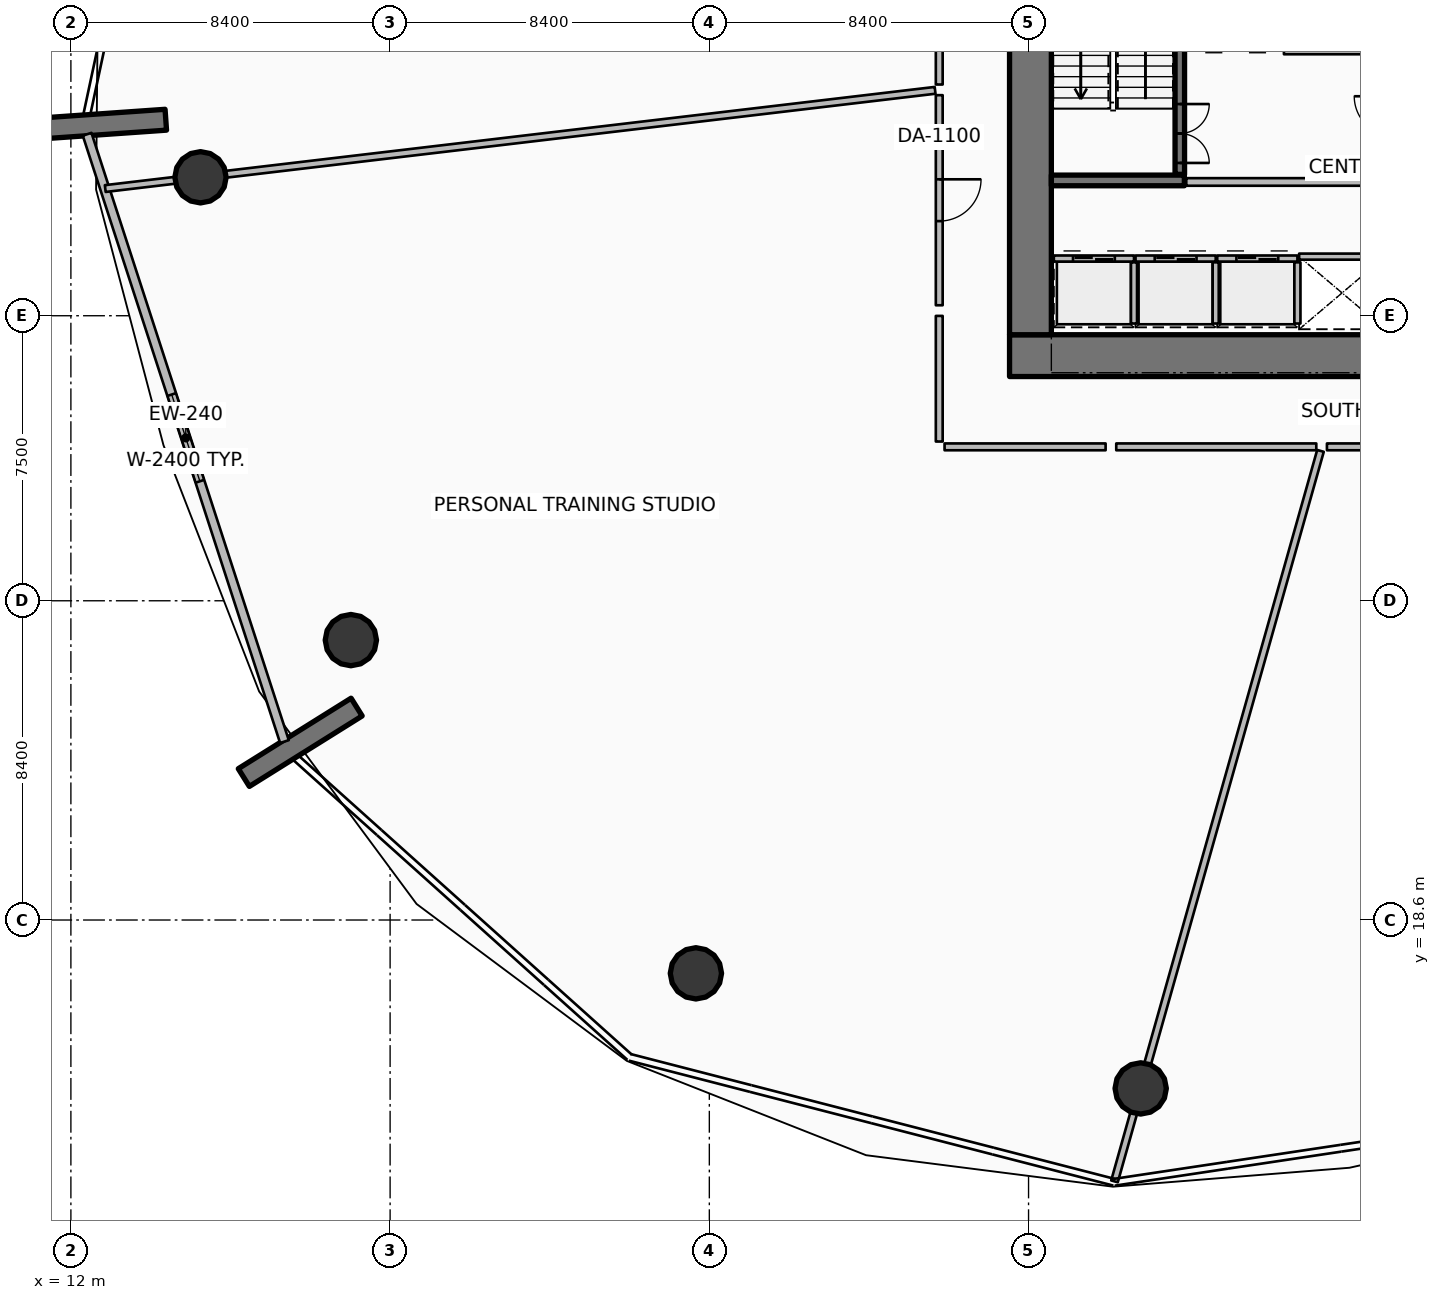
"""IFC4 building model, lengths in metres.
Left out: names, types, materials, properties, quantities, classifications, styles, units other than length and angle.
Written with IfcOpenShell. Run it as: python <this file> out.ifc"""

import sys

from ifc_helpers import new_model, si_unit, direction, frame, frame_2d, origin, origin_2d, place, context, subcontext, project, spatial, rectangle, circle, extrude, element, fill, save


model = new_model("IFC4")
c1 = context("Model", 3, precision=1e-05, world=origin(), true_north=direction((0.0, 1.0)))
c2 = subcontext(c1, "Body", "Model", "MODEL_VIEW")
j1 = project(units=[si_unit("LENGTHUNIT", "METRE"), si_unit("PLANEANGLEUNIT", "RADIAN")], contexts=[c1])
p1 = place(None, origin())
s1 = spatial("IfcSite", under=j1, at=p1, CompositionType="ELEMENT")
p2 = place(p1, origin())
s2 = spatial("IfcBuilding", under=s1, at=p2, CompositionType="ELEMENT")
p3 = place(p2, frame((0.0, 0.0, 16.8)))
s3 = spatial("IfcBuildingStorey", under=s2, at=p3, CompositionType="ELEMENT", Elevation=16.8)
p4 = place(p3, frame((36.7, 33.45, 0.0), z_axis=(0.0, 0.0, 1.0), x_axis=(1.0, 0.0, 0.0)))
e1 = element("IfcWall", 1, at=p4, inside=s3, PredefinedType="SHEAR", context=c2, shape_type="SweptSolid", body=[
    extrude(rectangle(XDim=10.2, YDim=1.1, at=frame_2d((5.1, 0.0))), origin(), (0.0, 0.0, 1.0), 4.8),
])
p5 = place(p3, frame((37.25, 34.0, 0.0), z_axis=(0.0, 0.0, 1.0), x_axis=(0.0, 1.0, 0.0)))
e2 = element("IfcWall", 2, at=p5, inside=s3, PredefinedType="SHEAR", context=c2, shape_type="SweptSolid", body=[
    extrude(rectangle(XDim=16.0, YDim=1.1, at=frame_2d((8.0, 0.0))), origin(), (0.0, 0.0, 1.0), 4.8),
])
p6 = place(p3, frame((37.8, 38.06, 0.0), z_axis=(0.0, 0.0, 1.0), x_axis=(1.0, 0.0, 0.0)))
e3 = element("IfcWall", 3, at=p6, inside=s3, PredefinedType="SHEAR", context=c2, shape_type="SweptSolid", body=[
    extrude(rectangle(XDim=3.5, YDim=0.28, at=frame_2d((1.75, 0.0))), origin(), (0.0, 0.0, 1.0), 4.8),
])
for number, where, z_axis, x_axis in (
    (4, (14.497, 39.657, 0.0), (0.0, 0.0, 1.0), (-0.998, -0.07, 0.0)),
    (5, (19.519, 24.203, 0.0), (0.0, 0.0, 1.0), (-0.848, -0.53, 0.0)),
):
    element("IfcWall", number, at=place(p3, frame(where, z_axis=z_axis, x_axis=x_axis)), inside=s3, PredefinedType="SOLIDWALL", context=c2, shape_type="SweptSolid", body=[
        extrude(rectangle(XDim=3.5, YDim=0.55, at=frame_2d((1.75, 0.0))), origin(), (0.0, 0.0, 1.0), 4.8),
    ])
for number, where, z_axis, x_axis in (
    (6, (15.41, 38.143, 0.0), (0.0, 0.0, 1.0), (1.0, 0.0, 0.0)),
    (7, (19.367, 25.965, 0.0), (0.0, 0.0, 1.0), (1.0, 0.0, 0.0)),
    (8, (28.447, 17.197, 0.0), (0.0, 0.0, 1.0), (1.0, 0.0, 0.0)),
    (9, (40.151, 14.169, 0.0), (0.0, 0.0, 1.0), (1.0, 0.0, 0.0)),
):
    element("IfcColumn", number, at=place(p3, frame(where, z_axis=z_axis, x_axis=x_axis)), inside=s3, PredefinedType="COLUMN", context=c2, shape_type="SweptSolid", body=[
        extrude(circle(Radius=0.675, at=origin_2d()), origin(), (0.0, 0.0, 1.0), 4.4),
    ])
p7 = place(p3, frame((12.427, 39.275, 0.0), z_axis=(0.0, 0.0, 1.0), x_axis=(0.309022005354, -0.951054888115, 0.0)))
e10 = element("IfcWall", 10, at=p7, inside=s3, PredefinedType="SOLIDWALL", context=c2, shape_type="SweptSolid", body=[
    extrude(rectangle(XDim=16.803, YDim=0.24, at=frame_2d((8.401, 0.0))), origin(), (0.0, 0.0, 1.0), 3.35),
])
p8 = place(p7, frame((7.201, 0.0, 0.85)))
e11 = element("IfcOpeningElement", 11, at=p8, cuts=e10, PredefinedType="OPENING", context=c2, shape_type="SweptSolid", body=[
    extrude(rectangle(XDim=2.4, YDim=2.1, at=frame_2d((1.2, 1.05))), frame((0.0, 0.13, 0.0), z_axis=(0.0, -1.0, 0.0), x_axis=(1.0, 0.0, 0.0)), (0.0, 0.0, 1.0), 0.26),
])
p9 = place(p3, frame((41.18, 38.22, 0.0), z_axis=(0.0, 0.0, 1.0), x_axis=(0.0, 1.0, 0.0)))
e12 = element("IfcWall", 12, at=p9, inside=s3, PredefinedType="SOLIDWALL", context=c2, shape_type="SweptSolid", body=[
    extrude(rectangle(XDim=7.56, YDim=0.25, at=frame_2d((3.78, 0.0))), origin(), (0.0, 0.0, 1.0), 4.4),
])
p10 = place(p9, frame((0.3, 0.0, 0.0)))
e13 = element("IfcOpeningElement", 13, at=p10, cuts=e12, PredefinedType="OPENING", context=c2, shape_type="SweptSolid", body=[
    extrude(rectangle(XDim=1.55, YDim=2.15, at=frame_2d((0.775, 1.075))), frame((0.0, 0.135, 0.0), z_axis=(0.0, -1.0, 0.0), x_axis=(1.0, 0.0, 0.0)), (0.0, 0.0, 1.0), 0.27),
])
p11 = place(p3, frame((37.865, 36.005, 0.0), z_axis=(0.0, 0.0, 1.0), x_axis=(1.0, 0.0, 0.0)))
e14 = element("IfcWall", 14, at=p11, inside=s3, PredefinedType="PARTITIONING", context=c2, shape_type="SweptSolid", body=[
    extrude(rectangle(XDim=2.11, YDim=0.16, at=frame_2d((1.055, 0.0))), origin(), (0.0, 0.0, 1.0), 4.4),
])
p12 = place(p11, frame((0.505, 0.0, 0.0)))
e15 = element("IfcOpeningElement", 15, at=p12, cuts=e14, PredefinedType="OPENING", context=c2, shape_type="SweptSolid", body=[
    extrude(rectangle(XDim=1.1, YDim=2.1, at=frame_2d((0.55, 1.05))), frame((0.0, 0.09, 0.0), z_axis=(0.0, -1.0, 0.0), x_axis=(1.0, 0.0, 0.0)), (0.0, 0.0, 1.0), 0.18),
])
p13 = place(p3, frame((39.975, 34.295, 0.0), z_axis=(0.0, 0.0, 1.0), x_axis=(0.0, 1.0, 0.0)))
e16 = element("IfcWall", 16, at=p13, inside=s3, PredefinedType="PARTITIONING", context=c2, shape_type="SweptSolid", body=[
    extrude(rectangle(XDim=1.61, YDim=0.16, at=frame_2d((0.805, 0.0))), origin(), (0.0, 0.0, 1.0), 4.4),
])
p14 = place(p3, frame((40.015, 36.005, 0.0), z_axis=(0.0, 0.0, 1.0), x_axis=(1.0, 0.0, 0.0)))
e17 = element("IfcWall", 17, at=p14, inside=s3, PredefinedType="PARTITIONING", context=c2, shape_type="SweptSolid", body=[
    extrude(rectangle(XDim=2.11, YDim=0.16, at=frame_2d((1.055, 0.0))), origin(), (0.0, 0.0, 1.0), 4.4),
])
p15 = place(p14, frame((0.505, 0.0, 0.0)))
e18 = element("IfcOpeningElement", 18, at=p15, cuts=e17, PredefinedType="OPENING", context=c2, shape_type="SweptSolid", body=[
    extrude(rectangle(XDim=1.1, YDim=2.1, at=frame_2d((0.55, 1.05))), frame((0.0, 0.09, 0.0), z_axis=(0.0, -1.0, 0.0), x_axis=(1.0, 0.0, 0.0)), (0.0, 0.0, 1.0), 0.18),
])
p16 = place(p3, frame((42.125, 34.295, 0.0), z_axis=(0.0, 0.0, 1.0), x_axis=(0.0, 1.0, 0.0)))
e19 = element("IfcWall", 19, at=p16, inside=s3, PredefinedType="PARTITIONING", context=c2, shape_type="SweptSolid", body=[
    extrude(rectangle(XDim=1.61, YDim=0.16, at=frame_2d((0.805, 0.0))), origin(), (0.0, 0.0, 1.0), 4.4),
])
p17 = place(p3, frame((42.165, 36.005, 0.0), z_axis=(0.0, 0.0, 1.0), x_axis=(1.0, 0.0, 0.0)))
e20 = element("IfcWall", 20, at=p17, inside=s3, PredefinedType="PARTITIONING", context=c2, shape_type="SweptSolid", body=[
    extrude(rectangle(XDim=2.11, YDim=0.16, at=frame_2d((1.055, 0.0))), origin(), (0.0, 0.0, 1.0), 4.4),
])
p18 = place(p17, frame((0.505, 0.0, 0.0)))
e21 = element("IfcOpeningElement", 21, at=p18, cuts=e20, PredefinedType="OPENING", context=c2, shape_type="SweptSolid", body=[
    extrude(rectangle(XDim=1.1, YDim=2.1, at=frame_2d((0.55, 1.05))), frame((0.0, 0.09, 0.0), z_axis=(0.0, -1.0, 0.0), x_axis=(1.0, 0.0, 0.0)), (0.0, 0.0, 1.0), 0.18),
])
p19 = place(p3, frame((44.275, 34.295, 0.0), z_axis=(0.0, 0.0, 1.0), x_axis=(0.0, 1.0, 0.0)))
e22 = element("IfcWall", 22, at=p19, inside=s3, PredefinedType="PARTITIONING", context=c2, shape_type="SweptSolid", body=[
    extrude(rectangle(XDim=1.61, YDim=0.16, at=frame_2d((0.805, 0.0))), origin(), (0.0, 0.0, 1.0), 4.4),
])
p20 = place(p3, frame((44.32, 36.055, 0.0), z_axis=(0.0, 0.0, 1.0), x_axis=(1.0, 0.0, 0.0)))
e23 = element("IfcWall", 23, at=p20, inside=s3, PredefinedType="PARTITIONING", context=c2, shape_type="SweptSolid", body=[
    extrude(rectangle(XDim=2.26, YDim=0.16, at=frame_2d((1.13, 0.0))), origin(), (0.0, 0.0, 1.0), 4.4),
])
p21 = place(p3, frame((41.35, 38.02, 0.0), z_axis=(0.0, 0.0, 1.0), x_axis=(1.0, 0.0, 0.0)))
e24 = element("IfcWall", 24, at=p21, inside=s3, PredefinedType="PARTITIONING", context=c2, shape_type="SweptSolid", body=[
    extrude(rectangle(XDim=5.37, YDim=0.2, at=frame_2d((2.685, 0.0))), origin(), (0.0, 0.0, 1.0), 4.4),
])
p22 = place(p3, frame((43.92, 41.48, 0.0), z_axis=(0.0, 0.0, 1.0), x_axis=(1.0, 0.0, 0.0)))
e25 = element("IfcWall", 25, at=p22, inside=s3, PredefinedType="PARTITIONING", context=c2, shape_type="SweptSolid", body=[
    extrude(rectangle(XDim=2.8, YDim=0.2, at=frame_2d((1.4, 0.0))), origin(), (0.0, 0.0, 1.0), 4.4),
])
p23 = place(p3, frame((34.85, 45.569, 0.0), z_axis=(0.0, 0.0, 1.0), x_axis=(0.0, -1.0, 0.0)))
e26 = element("IfcWall", 26, at=p23, inside=s3, PredefinedType="PARTITIONING", context=c2, shape_type="SweptSolid", body=[
    extrude(rectangle(XDim=4.985, YDim=0.18, at=frame_2d((2.493, 0.0))), origin(), (0.0, 0.0, 1.0), 3.613),
])
p24 = place(p3, frame((34.741, 40.431, 0.0), z_axis=(0.0, 0.0, 1.0), x_axis=(-0.993068662125, -0.117535663975, 0.0)))
e27 = element("IfcWall", 27, at=p24, inside=s3, PredefinedType="PARTITIONING", context=c2, shape_type="SweptSolid", body=[
    extrude(rectangle(XDim=21.989, YDim=0.18, at=frame_2d((10.994, 0.0))), origin(), (0.0, 0.0, 1.0), 3.613),
])
p25 = place(p3, frame((34.85, 40.304, 0.0), z_axis=(0.0, 0.0, 1.0), x_axis=(0.0, -1.0, 0.0)))
e28 = element("IfcWall", 28, at=p25, inside=s3, PredefinedType="PARTITIONING", context=c2, shape_type="SweptSolid", body=[
    extrude(rectangle(XDim=5.528, YDim=0.18, at=frame_2d((2.764, 0.0))), origin(), (0.0, 0.0, 1.0), 3.613),
])
p26 = place(p25, frame((2.214, 0.0, 0.0)))
e29 = element("IfcOpeningElement", 29, at=p26, cuts=e28, PredefinedType="OPENING", context=c2, shape_type="SweptSolid", body=[
    extrude(rectangle(XDim=1.1, YDim=2.1, at=frame_2d((0.55, 1.05))), frame((0.0, 0.1, 0.0), z_axis=(0.0, -1.0, 0.0), x_axis=(1.0, 0.0, 0.0)), (0.0, 0.0, 1.0), 0.2),
])
p27 = place(p3, frame((34.85, 34.496, 0.0), z_axis=(0.0, 0.0, 1.0), x_axis=(0.0, -1.0, 0.0)))
e30 = element("IfcWall", 30, at=p27, inside=s3, PredefinedType="PARTITIONING", context=c2, shape_type="SweptSolid", body=[
    extrude(rectangle(XDim=3.306, YDim=0.18, at=frame_2d((1.653, 0.0))), origin(), (0.0, 0.0, 1.0), 3.613),
])
p28 = place(p3, frame((34.99, 31.05, 0.0), z_axis=(0.0, 0.0, 1.0), x_axis=(1.0, 0.0, 0.0)))
e31 = element("IfcWall", 31, at=p28, inside=s3, PredefinedType="PARTITIONING", context=c2, shape_type="SweptSolid", body=[
    extrude(rectangle(XDim=4.238, YDim=0.18, at=frame_2d((2.119, 0.0))), origin(), (0.0, 0.0, 1.0), 3.613),
])
p29 = place(p3, frame((39.508, 31.05, 0.0), z_axis=(0.0, 0.0, 1.0), x_axis=(1.0, 0.0, 0.0)))
e32 = element("IfcWall", 32, at=p29, inside=s3, PredefinedType="PARTITIONING", context=c2, shape_type="SweptSolid", body=[
    extrude(rectangle(XDim=5.264, YDim=0.18, at=frame_2d((2.632, 0.0))), origin(), (0.0, 0.0, 1.0), 3.613),
])
p30 = place(p3, frame((44.882, 30.944, 0.0), z_axis=(0.0, 0.0, 1.0), x_axis=(-0.271438678553, -0.962455736014, 0.0)))
e33 = element("IfcWall", 33, at=p30, inside=s3, PredefinedType="PARTITIONING", context=c2, shape_type="SweptSolid", body=[
    extrude(rectangle(XDim=19.971, YDim=0.18, at=frame_2d((9.985, 0.0))), origin(), (0.0, 0.0, 1.0), 3.613),
])
p31 = place(p3, frame((45.052, 31.05, 0.0), z_axis=(0.0, 0.0, 1.0), x_axis=(1.0, 0.0, 0.0)))
e34 = element("IfcWall", 34, at=p31, inside=s3, PredefinedType="PARTITIONING", context=c2, shape_type="SweptSolid", body=[
    extrude(rectangle(XDim=4.104, YDim=0.18, at=frame_2d((2.052, 0.0))), origin(), (0.0, 0.0, 1.0), 3.613),
])
p32 = place(p8, origin())
e35 = element("IfcWindow", 35, at=p32, inside=s3, PartitioningType="SINGLE_PANEL", PredefinedType="WINDOW", context=c2, shape_type="SweptSolid", body=[
    extrude(rectangle(XDim=2.4, YDim=2.1, at=frame_2d((1.2, 1.05))), frame((0.0, 0.03, 0.0), z_axis=(0.0, -1.0, 0.0), x_axis=(1.0, 0.0, 0.0)), (0.0, 0.0, 1.0), 0.06),
])
fill(e11, e35)
p33 = place(p10, origin())
e36 = element("IfcDoor", 36, at=p33, inside=s3, OperationType="DOUBLE_DOOR_SINGLE_SWING", PredefinedType="DOOR", context=c2, shape_type="SweptSolid", body=[
    extrude(rectangle(XDim=1.55, YDim=2.15, at=frame_2d((0.775, 1.075))), frame((0.0, 0.025, 0.0), z_axis=(0.0, -1.0, 0.0), x_axis=(1.0, 0.0, 0.0)), (0.0, 0.0, 1.0), 0.05),
])
fill(e13, e36)
p34 = place(p12, origin())
e37 = element("IfcDoor", 37, at=p34, inside=s3, OperationType="DOUBLE_DOOR_SLIDING", PredefinedType="DOOR", context=c2, shape_type="SweptSolid", body=[
    extrude(rectangle(XDim=1.1, YDim=2.1, at=frame_2d((0.55, 1.05))), frame((0.0, 0.025, 0.0), z_axis=(0.0, -1.0, 0.0), x_axis=(1.0, 0.0, 0.0)), (0.0, 0.0, 1.0), 0.05),
])
fill(e15, e37)
p35 = place(p15, origin())
e38 = element("IfcDoor", 38, at=p35, inside=s3, OperationType="DOUBLE_DOOR_SLIDING", PredefinedType="DOOR", context=c2, shape_type="SweptSolid", body=[
    extrude(rectangle(XDim=1.1, YDim=2.1, at=frame_2d((0.55, 1.05))), frame((0.0, 0.025, 0.0), z_axis=(0.0, -1.0, 0.0), x_axis=(1.0, 0.0, 0.0)), (0.0, 0.0, 1.0), 0.05),
])
fill(e18, e38)
p36 = place(p18, origin())
e39 = element("IfcDoor", 39, at=p36, inside=s3, OperationType="DOUBLE_DOOR_SLIDING", PredefinedType="DOOR", context=c2, shape_type="SweptSolid", body=[
    extrude(rectangle(XDim=1.1, YDim=2.1, at=frame_2d((0.55, 1.05))), frame((0.0, 0.025, 0.0), z_axis=(0.0, -1.0, 0.0), x_axis=(1.0, 0.0, 0.0)), (0.0, 0.0, 1.0), 0.05),
])
fill(e21, e39)
p37 = place(p26, origin())
e40 = element("IfcDoor", 40, at=p37, inside=s3, OperationType="SINGLE_SWING_LEFT", PredefinedType="DOOR", context=c2, shape_type="SweptSolid", body=[
    extrude(rectangle(XDim=1.1, YDim=2.1, at=frame_2d((0.55, 1.05))), frame((0.0, 0.025, 0.0), z_axis=(0.0, -1.0, 0.0), x_axis=(1.0, 0.0, 0.0)), (0.0, 0.0, 1.0), 0.05),
])
fill(e29, e40)
save(model, sys.argv[1])
